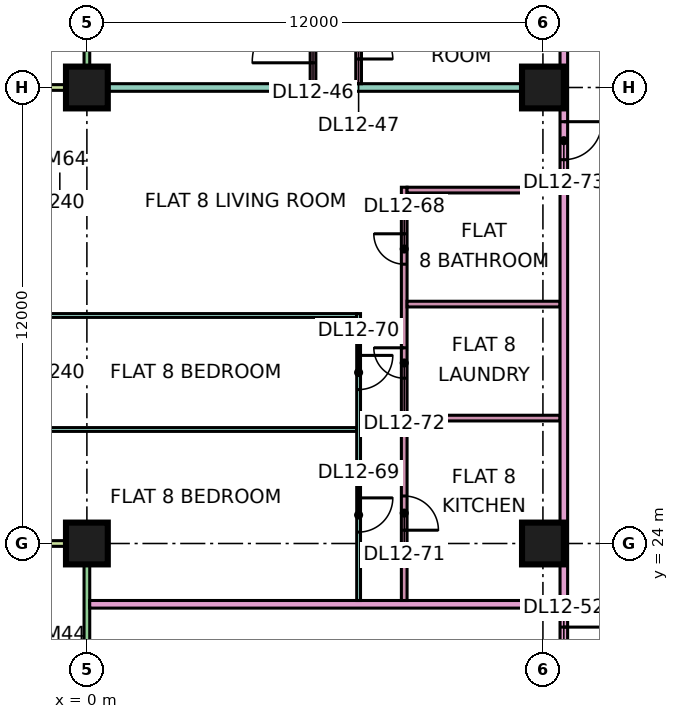
"""IFC4 building model, lengths in metres.
Left out: names, types, materials, properties, quantities, classifications, styles, units other than length and angle.
Written with IfcOpenShell. Run it as: python <this file> out.ifc"""

import sys

from ifc_helpers import new_model, si_unit, direction, frame, frame_2d, origin, origin_2d, place, context, subcontext, project, spatial, rectangle, extrude, element, fill, save


model = new_model("IFC4")
c1 = context("Model", 3, precision=1e-05, world=origin(), true_north=direction((0.0, 1.0)))
c2 = subcontext(c1, "Body", "Model", "MODEL_VIEW")
j1 = project(units=[si_unit("LENGTHUNIT", "METRE"), si_unit("PLANEANGLEUNIT", "RADIAN")], contexts=[c1])
p1 = place(None, origin())
s1 = spatial("IfcSite", under=j1, at=p1, CompositionType="ELEMENT")
p2 = place(p1, origin())
s2 = spatial("IfcBuilding", under=s1, at=p2, CompositionType="ELEMENT")
p3 = place(p2, frame((0.0, 0.0, 60.15)))
s3 = spatial("IfcBuildingStorey", under=s2, at=p3, CompositionType="ELEMENT", Elevation=60.15)
p4 = place(p3, frame((0.0, 24.0, 0.0), z_axis=(0.0, 0.0, 1.0), x_axis=(1.0, 0.0, 0.0)))
e1 = element("IfcColumn", 1, at=p4, inside=s3, PredefinedType="COLUMN", context=c2, shape_type="SweptSolid", body=[
    extrude(rectangle(XDim=1.1, YDim=1.1, at=origin_2d()), origin(), (0.0, 0.0, 1.0), 3.75),
])
p5 = place(p3, frame((0.0, 36.0, 0.0), z_axis=(0.0, 0.0, 1.0), x_axis=(1.0, 0.0, 0.0)))
e2 = element("IfcColumn", 2, at=p5, inside=s3, PredefinedType="COLUMN", context=c2, shape_type="SweptSolid", body=[
    extrude(rectangle(XDim=1.1, YDim=1.1, at=origin_2d()), origin(), (0.0, 0.0, 1.0), 3.75),
])
for number, where, z_axis, x_axis in (
    (3, (12.0, 24.0, 0.0), (0.0, 0.0, 1.0), (1.0, 0.0, 0.0)),
    (4, (12.0, 36.0, 0.0), (0.0, 0.0, 1.0), (1.0, 0.0, 0.0)),
):
    element("IfcColumn", number, at=place(p3, frame(where, z_axis=z_axis, x_axis=x_axis)), inside=s3, PredefinedType="COLUMN", context=c2, shape_type="SweptSolid", body=[
        extrude(rectangle(XDim=1.1, YDim=1.1, at=origin_2d()), origin(), (0.0, 0.0, 1.0), 3.75),
    ])
p6 = place(p3, frame((0.0, 47.925, 0.0), z_axis=(0.0, 0.0, 1.0), x_axis=(0.0, -1.0, 0.0)))
e5 = element("IfcWall", 5, at=p6, inside=s3, PredefinedType="SOLIDWALL", context=c2, shape_type="SweptSolid", body=[
    extrude(rectangle(XDim=11.85, YDim=0.15, at=frame_2d((5.925, 0.0))), origin(), (0.0, 0.0, 1.0), 3.35),
])
p7 = place(p6, frame((0.538, 0.0, 0.45)))
e6 = element("IfcOpeningElement", 6, at=p7, cuts=e5, PredefinedType="OPENING", context=c2, shape_type="SweptSolid", body=[
    extrude(rectangle(XDim=1.2, YDim=2.4, at=frame_2d((0.6, 1.2))), frame((0.0, 0.085, 0.0), z_axis=(0.0, -1.0, 0.0), x_axis=(1.0, 0.0, 0.0)), (0.0, 0.0, 1.0), 0.17),
])
p8 = place(p6, frame((4.15, 0.0, 0.45)))
e7 = element("IfcOpeningElement", 7, at=p8, cuts=e5, PredefinedType="OPENING", context=c2, shape_type="SweptSolid", body=[
    extrude(rectangle(XDim=1.2, YDim=2.4, at=frame_2d((0.6, 1.2))), frame((0.0, 0.085, 0.0), z_axis=(0.0, -1.0, 0.0), x_axis=(1.0, 0.0, 0.0)), (0.0, 0.0, 1.0), 0.17),
])
p9 = place(p6, frame((6.525, 0.0, 0.0)))
e8 = element("IfcOpeningElement", 8, at=p9, cuts=e5, PredefinedType="OPENING", context=c2, shape_type="SweptSolid", body=[
    extrude(rectangle(XDim=1.8, YDim=2.4, at=frame_2d((0.9, 1.2))), frame((0.0, 0.085, 0.0), z_axis=(0.0, -1.0, 0.0), x_axis=(1.0, 0.0, 0.0)), (0.0, 0.0, 1.0), 0.17),
])
p10 = place(p6, frame((9.5, 0.0, 0.45)))
e9 = element("IfcOpeningElement", 9, at=p10, cuts=e5, PredefinedType="OPENING", context=c2, shape_type="SweptSolid", body=[
    extrude(rectangle(XDim=1.2, YDim=2.4, at=frame_2d((0.6, 1.2))), frame((0.0, 0.085, 0.0), z_axis=(0.0, -1.0, 0.0), x_axis=(1.0, 0.0, 0.0)), (0.0, 0.0, 1.0), 0.17),
])
p11 = place(p3, frame((-1.5, 36.0, 0.0), z_axis=(0.0, 0.0, 1.0), x_axis=(1.0, 0.0, 0.0)))
e10 = element("IfcWall", 10, at=p11, inside=s3, PredefinedType="SOLIDWALL", context=c2, shape_type="SweptSolid", body=[
    extrude(rectangle(XDim=1.5, YDim=0.15, at=frame_2d((0.75, 0.0))), origin(), (0.0, 0.0, 1.0), 3.35),
])
p12 = place(p3, frame((0.0, 23.925, 0.0), z_axis=(0.0, 0.0, 1.0), x_axis=(0.0, -1.0, 0.0)))
e11 = element("IfcWall", 11, at=p12, inside=s3, PredefinedType="SOLIDWALL", context=c2, shape_type="SweptSolid", body=[
    extrude(rectangle(XDim=11.35, YDim=0.15, at=frame_2d((5.675, 0.0))), origin(), (0.0, 0.0, 1.0), 3.35),
])
p13 = place(p12, frame((6.738, 0.0, 0.0)))
e12 = element("IfcOpeningElement", 12, at=p13, cuts=e11, PredefinedType="OPENING", context=c2, shape_type="SweptSolid", body=[
    extrude(rectangle(XDim=1.8, YDim=2.4, at=frame_2d((0.9, 1.2))), frame((0.0, 0.085, 0.0), z_axis=(0.0, -1.0, 0.0), x_axis=(1.0, 0.0, 0.0)), (0.0, 0.0, 1.0), 0.17),
])
p14 = place(p3, frame((-1.5, 24.0, 0.0), z_axis=(0.0, 0.0, 1.0), x_axis=(1.0, 0.0, 0.0)))
e13 = element("IfcWall", 13, at=p14, inside=s3, PredefinedType="SOLIDWALL", context=c2, shape_type="SweptSolid", body=[
    extrude(rectangle(XDim=1.5, YDim=0.15, at=frame_2d((0.75, 0.0))), origin(), (0.0, 0.0, 1.0), 3.35),
])
p15 = place(p3, frame((-1.351, 27.0, 0.0), z_axis=(0.0, 0.0, 1.0), x_axis=(1.0, 0.0, 0.0)))
e14 = element("IfcWall", 14, at=p15, inside=s3, PredefinedType="PARTITIONING", context=c2, shape_type="SweptSolid", body=[
    extrude(rectangle(XDim=8.451, YDim=0.1, at=frame_2d((4.226, 0.0))), origin(), (0.0, 0.0, 1.0), 3.35),
])
p16 = place(p3, frame((-1.35, 30.0, 0.0), z_axis=(0.0, 0.0, 1.0), x_axis=(1.0, 0.0, 0.0)))
e15 = element("IfcWall", 15, at=p16, inside=s3, PredefinedType="PARTITIONING", context=c2, shape_type="SweptSolid", body=[
    extrude(rectangle(XDim=8.45, YDim=0.1, at=frame_2d((4.225, 0.0))), origin(), (0.0, 0.0, 1.0), 3.35),
])
e16 = element("IfcWall", 16, at=p5, inside=s3, PredefinedType="PARTITIONING", context=c2, shape_type="SweptSolid", body=[
    extrude(rectangle(XDim=12.45, YDim=0.2, at=frame_2d((6.225, 0.0))), origin(), (0.0, 0.0, 1.0), 3.35),
])
p17 = place(p3, frame((0.074, 22.4, 0.0), z_axis=(0.0, 0.0, 1.0), x_axis=(1.0, 0.0, 0.0)))
e17 = element("IfcWall", 17, at=p17, inside=s3, PredefinedType="PARTITIONING", context=c2, shape_type="SweptSolid", body=[
    extrude(rectangle(XDim=12.376, YDim=0.2, at=frame_2d((6.188, 0.0))), origin(), (0.0, 0.0, 1.0), 3.35),
])
p18 = place(p3, frame((5.95, 36.1, 0.0), z_axis=(0.0, 0.0, 1.0), x_axis=(0.0, 1.0, 0.0)))
e18 = element("IfcWall", 18, at=p18, inside=s3, PredefinedType="PARTITIONING", context=c2, shape_type="SweptSolid", body=[
    extrude(rectangle(XDim=28.25, YDim=0.15, at=frame_2d((14.125, 0.0))), origin(), (0.0, 0.0, 1.0), 3.35),
])
p19 = place(p18, frame((3.95, 0.0, 0.0)))
e19 = element("IfcOpeningElement", 19, at=p19, cuts=e18, PredefinedType="OPENING", context=c2, shape_type="SweptSolid", body=[
    extrude(rectangle(XDim=0.9, YDim=2.1, at=frame_2d((0.45, 1.05))), frame((0.0, 0.085, 0.0), z_axis=(0.0, -1.0, 0.0), x_axis=(1.0, 0.0, 0.0)), (0.0, 0.0, 1.0), 0.17),
])
p20 = place(p18, frame((12.95, 0.0, 0.0)))
e20 = element("IfcOpeningElement", 20, at=p20, cuts=e18, PredefinedType="OPENING", context=c2, shape_type="SweptSolid", body=[
    extrude(rectangle(XDim=0.9, YDim=2.1, at=frame_2d((0.45, 1.05))), frame((0.0, 0.085, 0.0), z_axis=(0.0, -1.0, 0.0), x_axis=(1.0, 0.0, 0.0)), (0.0, 0.0, 1.0), 0.17),
])
p21 = place(p18, frame((18.95, 0.0, 0.0)))
e21 = element("IfcOpeningElement", 21, at=p21, cuts=e18, PredefinedType="OPENING", context=c2, shape_type="SweptSolid", body=[
    extrude(rectangle(XDim=0.9, YDim=2.1, at=frame_2d((0.45, 1.05))), frame((0.0, 0.085, 0.0), z_axis=(0.0, -1.0, 0.0), x_axis=(1.0, 0.0, 0.0)), (0.0, 0.0, 1.0), 0.17),
])
p22 = place(p18, frame((21.95, 0.0, 0.0)))
e22 = element("IfcOpeningElement", 22, at=p22, cuts=e18, PredefinedType="OPENING", context=c2, shape_type="SweptSolid", body=[
    extrude(rectangle(XDim=0.9, YDim=2.1, at=frame_2d((0.45, 1.05))), frame((0.0, 0.085, 0.0), z_axis=(0.0, -1.0, 0.0), x_axis=(1.0, 0.0, 0.0)), (0.0, 0.0, 1.0), 0.17),
])
p23 = place(p18, frame((24.95, 0.0, 0.0)))
e23 = element("IfcOpeningElement", 23, at=p23, cuts=e18, PredefinedType="OPENING", context=c2, shape_type="SweptSolid", body=[
    extrude(rectangle(XDim=0.9, YDim=2.1, at=frame_2d((0.45, 1.05))), frame((0.0, 0.085, 0.0), z_axis=(0.0, -1.0, 0.0), x_axis=(1.0, 0.0, 0.0)), (0.0, 0.0, 1.0), 0.17),
])
p24 = place(p18, frame((15.95, 0.0, 0.0)))
e24 = element("IfcOpeningElement", 24, at=p24, cuts=e18, PredefinedType="OPENING", context=c2, shape_type="SweptSolid", body=[
    extrude(rectangle(XDim=0.9, YDim=2.1, at=frame_2d((0.45, 1.05))), frame((0.0, 0.085, 0.0), z_axis=(0.0, -1.0, 0.0), x_axis=(1.0, 0.0, 0.0)), (0.0, 0.0, 1.0), 0.17),
])
p25 = place(p18, frame((10.8, 0.0, 0.0)))
e25 = element("IfcOpeningElement", 25, at=p25, cuts=e18, PredefinedType="OPENING", context=c2, shape_type="SweptSolid", body=[
    extrude(rectangle(XDim=0.8, YDim=2.1, at=frame_2d((0.4, 1.05))), frame((0.0, 0.085, 0.0), z_axis=(0.0, -1.0, 0.0), x_axis=(1.0, 0.0, 0.0)), (0.0, 0.0, 1.0), 0.17),
])
p26 = place(p18, frame((0.55, 0.0, 0.0)))
e26 = element("IfcOpeningElement", 26, at=p26, cuts=e18, PredefinedType="OPENING", context=c2, shape_type="SweptSolid", body=[
    extrude(rectangle(XDim=1.6, YDim=2.1, at=frame_2d((0.8, 1.05))), frame((0.0, 0.085, 0.0), z_axis=(0.0, -1.0, 0.0), x_axis=(1.0, 0.0, 0.0)), (0.0, 0.0, 1.0), 0.17),
])
p27 = place(p18, frame((6.95, 0.0, 0.0)))
e27 = element("IfcOpeningElement", 27, at=p27, cuts=e18, PredefinedType="OPENING", context=c2, shape_type="SweptSolid", body=[
    extrude(rectangle(XDim=0.9, YDim=2.1, at=frame_2d((0.45, 1.05))), frame((0.0, 0.085, 0.0), z_axis=(0.0, -1.0, 0.0), x_axis=(1.0, 0.0, 0.0)), (0.0, 0.0, 1.0), 0.17),
])
p28 = place(p3, frame((7.15, 22.5, 0.0), z_axis=(0.0, 0.0, 1.0), x_axis=(0.0, 1.0, 0.0)))
e28 = element("IfcWall", 28, at=p28, inside=s3, PredefinedType="PARTITIONING", context=c2, shape_type="SweptSolid", body=[
    extrude(rectangle(XDim=7.55, YDim=0.1, at=frame_2d((3.775, 0.0))), origin(), (0.0, 0.0, 1.0), 3.35),
])
p29 = place(p28, frame((1.8, 0.0, 0.0)))
e29 = element("IfcOpeningElement", 29, at=p29, cuts=e28, PredefinedType="OPENING", context=c2, shape_type="SweptSolid", body=[
    extrude(rectangle(XDim=0.9, YDim=2.1, at=frame_2d((0.45, 1.05))), frame((0.0, 0.06, 0.0), z_axis=(0.0, -1.0, 0.0), x_axis=(1.0, 0.0, 0.0)), (0.0, 0.0, 1.0), 0.12),
])
p30 = place(p28, frame((5.55, 0.0, 0.0)))
e30 = element("IfcOpeningElement", 30, at=p30, cuts=e28, PredefinedType="OPENING", context=c2, shape_type="SweptSolid", body=[
    extrude(rectangle(XDim=0.9, YDim=2.1, at=frame_2d((0.45, 1.05))), frame((0.0, 0.06, 0.0), z_axis=(0.0, -1.0, 0.0), x_axis=(1.0, 0.0, 0.0)), (0.0, 0.0, 1.0), 0.12),
])
p31 = place(p3, frame((7.15, 36.1, 0.0), z_axis=(0.0, 0.0, 1.0), x_axis=(0.0, 1.0, 0.0)))
e31 = element("IfcWall", 31, at=p31, inside=s3, PredefinedType="PARTITIONING", context=c2, shape_type="SweptSolid", body=[
    extrude(rectangle(XDim=23.35, YDim=0.15, at=frame_2d((11.675, 0.0))), origin(), (0.0, 0.0, 1.0), 3.35),
])
p32 = place(p31, frame((10.25, 0.0, 0.0)))
e32 = element("IfcOpeningElement", 32, at=p32, cuts=e31, PredefinedType="OPENING", context=c2, shape_type="SweptSolid", body=[
    extrude(rectangle(XDim=0.8, YDim=2.1, at=frame_2d((0.4, 1.05))), frame((0.0, 0.085, 0.0), z_axis=(0.0, -1.0, 0.0), x_axis=(1.0, 0.0, 0.0)), (0.0, 0.0, 1.0), 0.17),
])
p33 = place(p31, frame((19.85, 0.0, 0.0)))
e33 = element("IfcOpeningElement", 33, at=p33, cuts=e31, PredefinedType="OPENING", context=c2, shape_type="SweptSolid", body=[
    extrude(rectangle(XDim=0.9, YDim=2.1, at=frame_2d((0.45, 1.05))), frame((0.0, 0.085, 0.0), z_axis=(0.0, -1.0, 0.0), x_axis=(1.0, 0.0, 0.0)), (0.0, 0.0, 1.0), 0.17),
])
p34 = place(p31, frame((3.65, 0.0, 0.0)))
e34 = element("IfcOpeningElement", 34, at=p34, cuts=e31, PredefinedType="OPENING", context=c2, shape_type="SweptSolid", body=[
    extrude(rectangle(XDim=0.8, YDim=2.1, at=frame_2d((0.4, 1.05))), frame((0.0, 0.085, 0.0), z_axis=(0.0, -1.0, 0.0), x_axis=(1.0, 0.0, 0.0)), (0.0, 0.0, 1.0), 0.17),
])
p35 = place(p31, frame((13.25, 0.0, 0.0)))
e35 = element("IfcOpeningElement", 35, at=p35, cuts=e31, PredefinedType="OPENING", context=c2, shape_type="SweptSolid", body=[
    extrude(rectangle(XDim=0.8, YDim=2.1, at=frame_2d((0.4, 1.05))), frame((0.0, 0.085, 0.0), z_axis=(0.0, -1.0, 0.0), x_axis=(1.0, 0.0, 0.0)), (0.0, 0.0, 1.0), 0.17),
])
p36 = place(p31, frame((15.65, 0.0, 0.0)))
e36 = element("IfcOpeningElement", 36, at=p36, cuts=e31, PredefinedType="OPENING", context=c2, shape_type="SweptSolid", body=[
    extrude(rectangle(XDim=0.8, YDim=2.1, at=frame_2d((0.4, 1.05))), frame((0.0, 0.085, 0.0), z_axis=(0.0, -1.0, 0.0), x_axis=(1.0, 0.0, 0.0)), (0.0, 0.0, 1.0), 0.17),
])
p37 = place(p31, frame((0.65, 0.0, 0.0)))
e37 = element("IfcOpeningElement", 37, at=p37, cuts=e31, PredefinedType="OPENING", context=c2, shape_type="SweptSolid", body=[
    extrude(rectangle(XDim=0.9, YDim=2.1, at=frame_2d((0.45, 1.05))), frame((0.0, 0.085, 0.0), z_axis=(0.0, -1.0, 0.0), x_axis=(1.0, 0.0, 0.0)), (0.0, 0.0, 1.0), 0.17),
])
p38 = place(p31, frame((6.95, 0.0, 0.0)))
e38 = element("IfcOpeningElement", 38, at=p38, cuts=e31, PredefinedType="OPENING", context=c2, shape_type="SweptSolid", body=[
    extrude(rectangle(XDim=0.8, YDim=2.1, at=frame_2d((0.4, 1.05))), frame((0.0, 0.085, 0.0), z_axis=(0.0, -1.0, 0.0), x_axis=(1.0, 0.0, 0.0)), (0.0, 0.0, 1.0), 0.17),
])
p39 = place(p3, frame((8.35, 22.5, 0.0), z_axis=(0.0, 0.0, 1.0), x_axis=(0.0, 1.0, 0.0)))
e39 = element("IfcWall", 39, at=p39, inside=s3, PredefinedType="PARTITIONING", context=c2, shape_type="SweptSolid", body=[
    extrude(rectangle(XDim=10.875, YDim=0.15, at=frame_2d((5.438, 0.0))), origin(), (0.0, 0.0, 1.0), 3.35),
])
p40 = place(p39, frame((8.85, 0.0, 0.0)))
e40 = element("IfcOpeningElement", 40, at=p40, cuts=e39, PredefinedType="OPENING", context=c2, shape_type="SweptSolid", body=[
    extrude(rectangle(XDim=0.8, YDim=2.1, at=frame_2d((0.4, 1.05))), frame((0.0, 0.085, 0.0), z_axis=(0.0, -1.0, 0.0), x_axis=(1.0, 0.0, 0.0)), (0.0, 0.0, 1.0), 0.17),
])
p41 = place(p39, frame((1.85, 0.0, 0.0)))
e41 = element("IfcOpeningElement", 41, at=p41, cuts=e39, PredefinedType="OPENING", context=c2, shape_type="SweptSolid", body=[
    extrude(rectangle(XDim=0.9, YDim=2.1, at=frame_2d((0.45, 1.05))), frame((0.0, 0.085, 0.0), z_axis=(0.0, -1.0, 0.0), x_axis=(1.0, 0.0, 0.0)), (0.0, 0.0, 1.0), 0.17),
])
p42 = place(p39, frame((5.85, 0.0, 0.0)))
e42 = element("IfcOpeningElement", 42, at=p42, cuts=e39, PredefinedType="OPENING", context=c2, shape_type="SweptSolid", body=[
    extrude(rectangle(XDim=0.8, YDim=2.1, at=frame_2d((0.4, 1.05))), frame((0.0, 0.085, 0.0), z_axis=(0.0, -1.0, 0.0), x_axis=(1.0, 0.0, 0.0)), (0.0, 0.0, 1.0), 0.17),
])
for number, where, z_axis, x_axis in (
    (43, (8.425, 27.3, 0.0), (0.0, 0.0, 1.0), (1.0, 0.0, 0.0)),
    (44, (8.425, 30.3, 0.0), (0.0, 0.0, 1.0), (1.0, 0.0, 0.0)),
    (45, (8.425, 33.3, 0.0), (0.0, 0.0, 1.0), (1.0, 0.0, 0.0)),
):
    element("IfcWall", number, at=place(p3, frame(where, z_axis=z_axis, x_axis=x_axis)), inside=s3, PredefinedType="PARTITIONING", context=c2, shape_type="SweptSolid", body=[
        extrude(rectangle(XDim=4.025, YDim=0.15, at=frame_2d((2.012, 0.0))), origin(), (0.0, 0.0, 1.0), 3.35),
    ])
p43 = place(p3, frame((12.55, 20.0, 0.0), z_axis=(0.0, 0.0, 1.0), x_axis=(0.0, 1.0, 0.0)))
e46 = element("IfcWall", 46, at=p43, inside=s3, PredefinedType="PARTITIONING", context=c2, shape_type="SweptSolid", body=[
    extrude(rectangle(XDim=42.926, YDim=0.2, at=frame_2d((21.463, 0.0))), origin(), (0.0, 0.0, 1.0), 3.35),
])
p44 = place(p43, frame((40.65, 0.0, 0.0)))
e47 = element("IfcOpeningElement", 47, at=p44, cuts=e46, PredefinedType="OPENING", context=c2, shape_type="SweptSolid", body=[
    extrude(rectangle(XDim=1.0, YDim=2.1, at=frame_2d((0.5, 1.05))), frame((0.0, 0.11, 0.0), z_axis=(0.0, -1.0, 0.0), x_axis=(1.0, 0.0, 0.0)), (0.0, 0.0, 1.0), 0.22),
])
p45 = place(p43, frame((0.6, 0.0, 0.0)))
e48 = element("IfcOpeningElement", 48, at=p45, cuts=e46, PredefinedType="OPENING", context=c2, shape_type="SweptSolid", body=[
    extrude(rectangle(XDim=1.2, YDim=2.1, at=frame_2d((0.6, 1.05))), frame((0.0, 0.11, 0.0), z_axis=(0.0, -1.0, 0.0), x_axis=(1.0, 0.0, 0.0)), (0.0, 0.0, 1.0), 0.22),
])
p46 = place(p43, frame((14.1, 0.0, 0.0)))
e49 = element("IfcOpeningElement", 49, at=p46, cuts=e46, PredefinedType="OPENING", context=c2, shape_type="SweptSolid", body=[
    extrude(rectangle(XDim=1.0, YDim=2.1, at=frame_2d((0.5, 1.05))), frame((0.0, 0.11, 0.0), z_axis=(0.0, -1.0, 0.0), x_axis=(1.0, 0.0, 0.0)), (0.0, 0.0, 1.0), 0.22),
])
p47 = place(p26, origin())
e50 = element("IfcDoor", 50, at=p47, inside=s3, OperationType="DOUBLE_DOOR_SINGLE_SWING", PredefinedType="DOOR", context=c2, shape_type="SweptSolid", body=[
    extrude(rectangle(XDim=1.6, YDim=2.1, at=frame_2d((0.8, 1.05))), frame((0.0, 0.025, 0.0), z_axis=(0.0, -1.0, 0.0), x_axis=(1.0, 0.0, 0.0)), (0.0, 0.0, 1.0), 0.05),
])
fill(e26, e50)
p48 = place(p37, frame((0.9, 0.0, 0.0), z_axis=(0.0, 0.0, 1.0), x_axis=(-1.0, 0.0, 0.0)))
e51 = element("IfcDoor", 51, at=p48, inside=s3, OperationType="SINGLE_SWING_LEFT", PredefinedType="DOOR", context=c2, shape_type="SweptSolid", body=[
    extrude(rectangle(XDim=0.9, YDim=2.1, at=frame_2d((0.45, 1.05))), frame((0.0, 0.025, 0.0), z_axis=(0.0, -1.0, 0.0), x_axis=(1.0, 0.0, 0.0)), (0.0, 0.0, 1.0), 0.05),
])
fill(e37, e51)
p49 = place(p45, origin())
e52 = element("IfcDoor", 52, at=p49, inside=s3, OperationType="SINGLE_SWING_RIGHT", PredefinedType="DOOR", context=c2, shape_type="SweptSolid", body=[
    extrude(rectangle(XDim=1.2, YDim=2.1, at=frame_2d((0.6, 1.05))), frame((0.0, 0.025, 0.0), z_axis=(0.0, -1.0, 0.0), x_axis=(1.0, 0.0, 0.0)), (0.0, 0.0, 1.0), 0.05),
])
fill(e48, e52)
p50 = place(p40, frame((0.8, 0.0, 0.0), z_axis=(0.0, 0.0, 1.0), x_axis=(-1.0, 0.0, 0.0)))
e53 = element("IfcDoor", 53, at=p50, inside=s3, OperationType="SINGLE_SWING_RIGHT", PredefinedType="DOOR", context=c2, shape_type="SweptSolid", body=[
    extrude(rectangle(XDim=0.8, YDim=2.1, at=frame_2d((0.4, 1.05))), frame((0.0, 0.025, 0.0), z_axis=(0.0, -1.0, 0.0), x_axis=(1.0, 0.0, 0.0)), (0.0, 0.0, 1.0), 0.05),
])
fill(e40, e53)
p51 = place(p29, origin())
e54 = element("IfcDoor", 54, at=p51, inside=s3, OperationType="SINGLE_SWING_RIGHT", PredefinedType="DOOR", context=c2, shape_type="SweptSolid", body=[
    extrude(rectangle(XDim=0.9, YDim=2.1, at=frame_2d((0.45, 1.05))), frame((0.0, 0.025, 0.0), z_axis=(0.0, -1.0, 0.0), x_axis=(1.0, 0.0, 0.0)), (0.0, 0.0, 1.0), 0.05),
])
fill(e29, e54)
p52 = place(p30, origin())
e55 = element("IfcDoor", 55, at=p52, inside=s3, OperationType="SINGLE_SWING_RIGHT", PredefinedType="DOOR", context=c2, shape_type="SweptSolid", body=[
    extrude(rectangle(XDim=0.9, YDim=2.1, at=frame_2d((0.45, 1.05))), frame((0.0, 0.025, 0.0), z_axis=(0.0, -1.0, 0.0), x_axis=(1.0, 0.0, 0.0)), (0.0, 0.0, 1.0), 0.05),
])
fill(e30, e55)
p53 = place(p41, frame((0.9, 0.0, 0.0), z_axis=(0.0, 0.0, 1.0), x_axis=(-1.0, 0.0, 0.0)))
e56 = element("IfcDoor", 56, at=p53, inside=s3, OperationType="SINGLE_SWING_LEFT", PredefinedType="DOOR", context=c2, shape_type="SweptSolid", body=[
    extrude(rectangle(XDim=0.9, YDim=2.1, at=frame_2d((0.45, 1.05))), frame((0.0, 0.025, 0.0), z_axis=(0.0, -1.0, 0.0), x_axis=(1.0, 0.0, 0.0)), (0.0, 0.0, 1.0), 0.05),
])
fill(e41, e56)
p54 = place(p42, frame((0.8, 0.0, 0.0), z_axis=(0.0, 0.0, 1.0), x_axis=(-1.0, 0.0, 0.0)))
e57 = element("IfcDoor", 57, at=p54, inside=s3, OperationType="SINGLE_SWING_RIGHT", PredefinedType="DOOR", context=c2, shape_type="SweptSolid", body=[
    extrude(rectangle(XDim=0.8, YDim=2.1, at=frame_2d((0.4, 1.05))), frame((0.0, 0.025, 0.0), z_axis=(0.0, -1.0, 0.0), x_axis=(1.0, 0.0, 0.0)), (0.0, 0.0, 1.0), 0.05),
])
fill(e42, e57)
p55 = place(p46, origin())
e58 = element("IfcDoor", 58, at=p55, inside=s3, OperationType="SINGLE_SWING_RIGHT", PredefinedType="DOOR", context=c2, shape_type="SweptSolid", body=[
    extrude(rectangle(XDim=1.0, YDim=2.1, at=frame_2d((0.5, 1.05))), frame((0.0, 0.025, 0.0), z_axis=(0.0, -1.0, 0.0), x_axis=(1.0, 0.0, 0.0)), (0.0, 0.0, 1.0), 0.05),
])
fill(e49, e58)
save(model, sys.argv[1])
